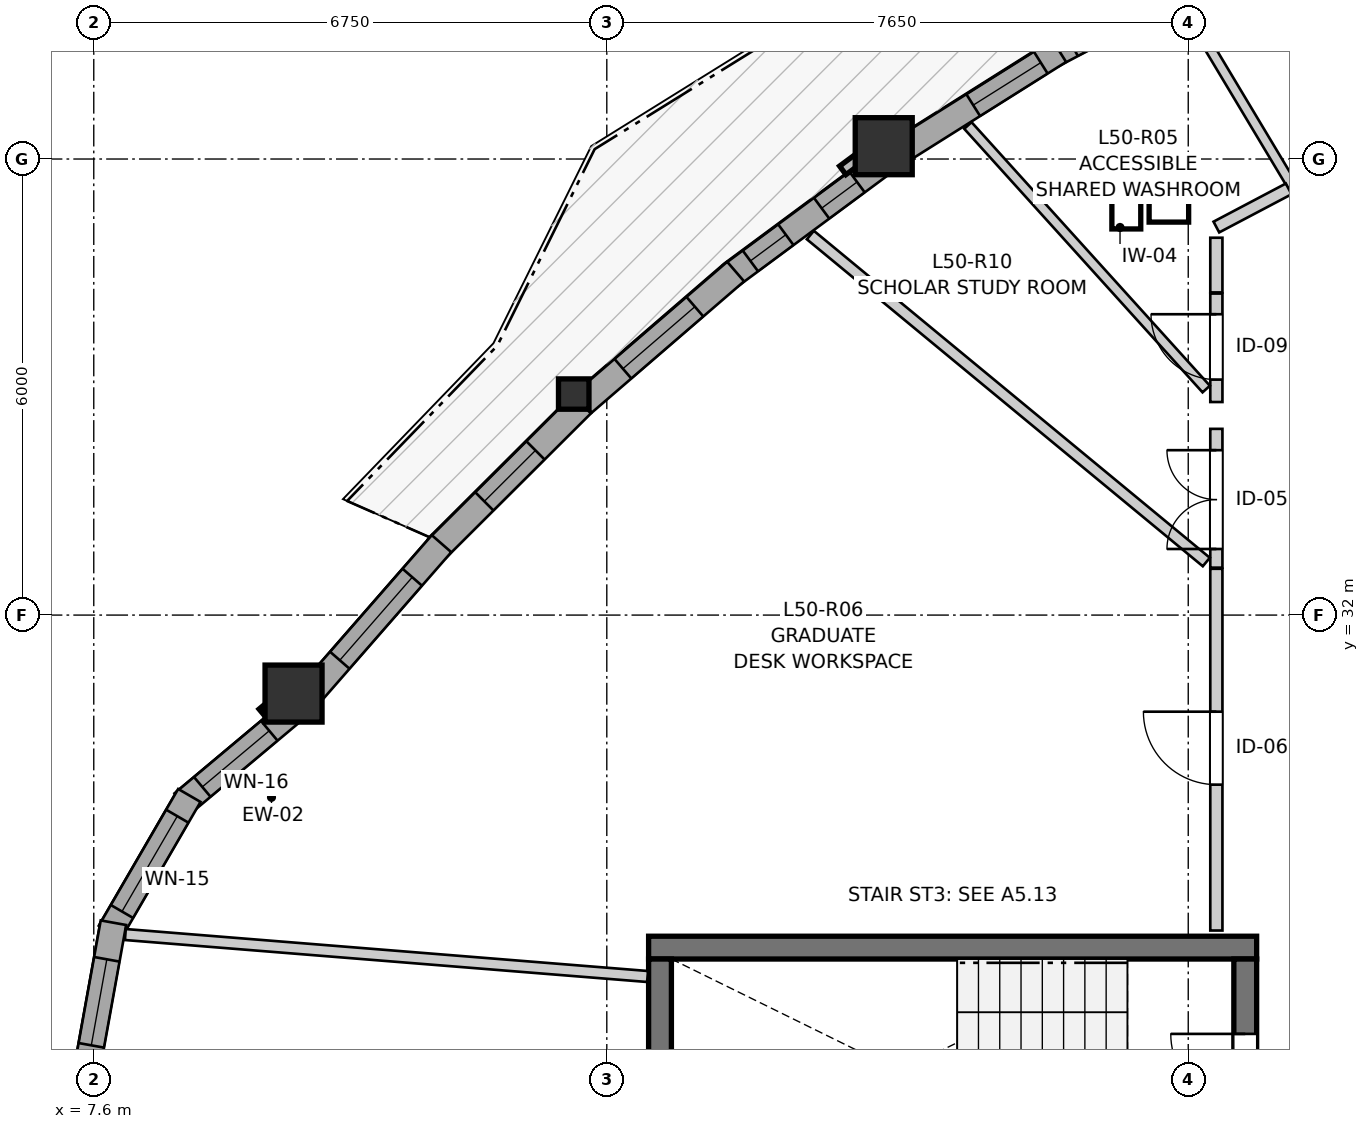
"""IFC4 building model, lengths in metres.
Left out: names, types, materials, properties, quantities, classifications, styles, units other than length and angle.
Written with IfcOpenShell. Run it as: python <this file> out.ifc"""

import sys

from ifc_helpers import new_model, si_unit, direction, frame, frame_2d, origin, origin_2d, place, context, subcontext, project, spatial, rectangle, i_section, extrude, source, transform, mapped, element, fill, save


model = new_model("IFC4")
c1 = context("Model", 3, precision=1e-05, world=origin(), true_north=direction((0.0, 1.0)))
c2 = subcontext(c1, "Body", "Model", "MODEL_VIEW")
j1 = project(units=[si_unit("LENGTHUNIT", "METRE"), si_unit("PLANEANGLEUNIT", "RADIAN")], contexts=[c1])
p1 = place(None, origin())
s1 = spatial("IfcSite", under=j1, at=p1, CompositionType="ELEMENT")
p2 = place(p1, origin())
s2 = spatial("IfcBuilding", under=s1, at=p2, CompositionType="ELEMENT")
p3 = place(p2, frame((0.0, 0.0, 168.2)))
s3 = spatial("IfcBuildingStorey", under=s2, at=p3, CompositionType="ELEMENT", Elevation=168.2)
p4 = place(p3, frame((22.9, 27.625, 0.0), z_axis=(0.0, 0.0, 1.0), x_axis=(-1.0, 0.0, 0.0)))
e1 = element("IfcWall", 1, at=p4, inside=s3, PredefinedType="SHEAR", context=c2, shape_type="SweptSolid", body=[
    extrude(rectangle(XDim=8.0, YDim=0.3, at=frame_2d((4.0, 0.0))), origin(), (0.0, 0.0, 1.0), 2.95),
])
p5 = place(p3, frame((15.05, 27.475, 0.0), z_axis=(0.0, 0.0, 1.0), x_axis=(0.0, -1.0, 0.0)))
e2 = element("IfcWall", 2, at=p5, inside=s3, PredefinedType="SHEAR", context=c2, shape_type="SweptSolid", body=[
    extrude(rectangle(XDim=2.95, YDim=0.3, at=frame_2d((1.475, 0.0))), origin(), (0.0, 0.0, 1.0), 2.95),
])
p6 = place(p3, frame((22.75, 24.525, 0.0), z_axis=(0.0, 0.0, 1.0), x_axis=(0.0, 1.0, 0.0)))
e3 = element("IfcWall", 3, at=p6, inside=s3, PredefinedType="SHEAR", context=c2, shape_type="SweptSolid", body=[
    extrude(rectangle(XDim=2.95, YDim=0.3, at=frame_2d((1.475, 0.0))), origin(), (0.0, 0.0, 1.0), 2.95),
])
p7 = place(p6, frame((0.985, 0.0, 0.0)))
e4 = element("IfcOpeningElement", 4, at=p7, cuts=e3, PredefinedType="OPENING", context=c2, shape_type="SweptSolid", body=[
    extrude(rectangle(XDim=0.98, YDim=2.15, at=frame_2d((0.49, 1.075))), frame((0.0, 0.16, 0.0), z_axis=(0.0, -1.0, 0.0), x_axis=(1.0, 0.0, 0.0)), (0.0, 0.0, 1.0), 0.32),
])
m1 = source(origin(), c2, "Body", "SweptSolid", [
    extrude(rectangle(XDim=0.75, YDim=0.75, at=origin_2d()), origin(), (0.0, 0.0, 1.0), 2.95),
])
for number, where, z_axis, x_axis in (
    (5, (10.229, 30.967, 0.0), (0.0, 0.0, 1.0), (1.0, 0.0, 0.0)),
    (6, (17.994, 38.169, 0.0), (0.0, 0.0, 1.0), (1.0, 0.0, 0.0)),
):
    element("IfcColumn", number, at=place(p3, frame(where, z_axis=z_axis, x_axis=x_axis)), inside=s3, PredefinedType="COLUMN", context=c2, shape_type="MappedRepresentation", body=[
        mapped(m1, transform((0.0, 0.0, 0.0), x_axis=(1.0, 0.0, 0.0), y_axis=(0.0, 1.0, 0.0), z_axis=(0.0, 0.0, 1.0), scale=1.0)),
    ])
m2 = source(origin(), c2, "Body", "SweptSolid", [
    extrude(i_section(OverallWidth=0.401, OverallDepth=0.399, WebThickness=0.023, FlangeThickness=0.036, FilletRadius=0.015, at=origin_2d()), origin(), (0.0, 0.0, 1.0), 2.95),
])
p8 = place(p3, frame((13.915, 34.908, 0.0), z_axis=(0.0, 0.0, 1.0), x_axis=(1.0, 0.0, 0.0)))
e7 = element("IfcColumn", 7, at=p8, inside=s3, PredefinedType="PILASTER", context=c2, shape_type="MappedRepresentation", body=[
    mapped(m2, transform((0.0, 0.0, 0.0), x_axis=(1.0, 0.0, 0.0), y_axis=(0.0, 1.0, 0.0), z_axis=(0.0, 0.0, 1.0), scale=1.0)),
])
p9 = place(p3, frame((10.219, 30.737, 0.0), z_axis=(0.0, 0.0, 1.0), x_axis=(-0.76661852922, -0.642102819381, 0.0)))
e8 = element("IfcWall", 8, at=p9, inside=s3, PredefinedType="SOLIDWALL", context=c2, shape_type="SweptSolid", body=[
    extrude(rectangle(XDim=1.888, YDim=0.34, at=frame_2d((0.944, 0.0))), origin(), (0.0, 0.0, 1.0), 2.53),
])
p10 = place(p9, frame((0.404, 0.0, 0.82)))
e9 = element("IfcOpeningElement", 9, at=p10, cuts=e8, PredefinedType="OPENING", context=c2, shape_type="SweptSolid", body=[
    extrude(rectangle(XDim=1.15, YDim=1.2, at=frame_2d((0.575, 0.6))), frame((0.0, 0.18, 0.0), z_axis=(0.0, -1.0, 0.0), x_axis=(1.0, 0.0, 0.0)), (0.0, 0.0, 1.0), 0.36),
])
p11 = place(p3, frame((8.858, 29.627, 0.0), z_axis=(0.0, 0.0, 1.0), x_axis=(-0.502177965272, -0.864764298058, 0.0)))
e10 = element("IfcWall", 10, at=p11, inside=s3, PredefinedType="SOLIDWALL", context=c2, shape_type="SweptSolid", body=[
    extrude(rectangle(XDim=2.081, YDim=0.34, at=frame_2d((1.041, 0.0))), origin(), (0.0, 0.0, 1.0), 2.53),
])
p12 = place(p11, frame((0.315, 0.0, 0.82)))
e11 = element("IfcOpeningElement", 11, at=p12, cuts=e10, PredefinedType="OPENING", context=c2, shape_type="SweptSolid", body=[
    extrude(rectangle(XDim=1.45, YDim=1.25, at=frame_2d((0.725, 0.625))), frame((0.0, 0.18, 0.0), z_axis=(0.0, -1.0, 0.0), x_axis=(1.0, 0.0, 0.0)), (0.0, 0.0, 1.0), 0.36),
])
p13 = place(p3, frame((7.859, 27.953, 0.0), z_axis=(0.0, 0.0, 1.0), x_axis=(-0.177605215389, -0.984101817632, 0.0)))
e12 = element("IfcWall", 12, at=p13, inside=s3, PredefinedType="SOLIDWALL", context=c2, shape_type="SweptSolid", body=[
    extrude(rectangle(XDim=2.081, YDim=0.34, at=frame_2d((1.041, 0.0))), origin(), (0.0, 0.0, 1.0), 2.53),
])
p14 = place(p13, frame((0.489, 0.0, 0.82)))
e13 = element("IfcOpeningElement", 13, at=p14, cuts=e12, PredefinedType="OPENING", context=c2, shape_type="SweptSolid", body=[
    extrude(rectangle(XDim=1.15, YDim=1.2, at=frame_2d((0.575, 0.6))), frame((0.0, 0.18, 0.0), z_axis=(0.0, -1.0, 0.0), x_axis=(1.0, 0.0, 0.0)), (0.0, 0.0, 1.0), 0.36),
])
p15 = place(p3, frame((22.526, 40.591, 0.0), z_axis=(0.0, 0.0, 1.0), x_axis=(-0.884394438343, -0.46674026763, 0.0)))
e14 = element("IfcWall", 14, at=p15, inside=s3, PredefinedType="SOLIDWALL", context=c2, shape_type="SweptSolid", body=[
    extrude(rectangle(XDim=2.601, YDim=0.34, at=frame_2d((1.301, 0.0))), origin(), (0.0, 0.0, 1.0), 2.53),
])
p16 = place(p15, frame((0.977, 0.0, 0.82)))
e15 = element("IfcOpeningElement", 15, at=p16, cuts=e14, PredefinedType="OPENING", context=c2, shape_type="SweptSolid", body=[
    extrude(rectangle(XDim=1.35, YDim=1.45, at=frame_2d((0.675, 0.725))), frame((0.0, 0.18, 0.0), z_axis=(0.0, -1.0, 0.0), x_axis=(1.0, 0.0, 0.0)), (0.0, 0.0, 1.0), 0.36),
])
p17 = place(p3, frame((20.303, 39.421, 0.0), z_axis=(0.0, 0.0, 1.0), x_axis=(-0.846381586821, -0.532576951707, 0.0)))
e16 = element("IfcWall", 16, at=p17, inside=s3, PredefinedType="SOLIDWALL", context=c2, shape_type="SweptSolid", body=[
    extrude(rectangle(XDim=2.466, YDim=0.34, at=frame_2d((1.233, 0.0))), origin(), (0.0, 0.0, 1.0), 2.53),
])
p18 = place(p17, frame((0.287, 0.0, 0.82)))
e17 = element("IfcOpeningElement", 17, at=p18, cuts=e16, PredefinedType="OPENING", context=c2, shape_type="SweptSolid", body=[
    extrude(rectangle(XDim=1.05, YDim=1.45, at=frame_2d((0.525, 0.725))), frame((0.0, 0.18, 0.0), z_axis=(0.0, -1.0, 0.0), x_axis=(1.0, 0.0, 0.0)), (0.0, 0.0, 1.0), 0.36),
])
p19 = place(p3, frame((17.97, 37.94, 0.0), z_axis=(0.0, 0.0, 1.0), x_axis=(-0.803844722302, -0.594839190393, 0.0)))
e18 = element("IfcWall", 18, at=p19, inside=s3, PredefinedType="SOLIDWALL", context=c2, shape_type="SweptSolid", body=[
    extrude(rectangle(XDim=2.481, YDim=0.34, at=frame_2d((1.24, 0.0))), origin(), (0.0, 0.0, 1.0), 2.53),
])
p20 = place(p19, frame((0.407, 0.0, 0.82)))
e19 = element("IfcOpeningElement", 19, at=p20, cuts=e18, PredefinedType="OPENING", context=c2, shape_type="SweptSolid", body=[
    extrude(rectangle(XDim=0.58, YDim=1.35, at=frame_2d((0.29, 0.675))), frame((0.0, 0.18, 0.0), z_axis=(0.0, -1.0, 0.0), x_axis=(1.0, 0.0, 0.0)), (0.0, 0.0, 1.0), 0.36),
])
p21 = place(p19, frame((1.573, 0.0, 0.82)))
e20 = element("IfcOpeningElement", 20, at=p21, cuts=e18, PredefinedType="OPENING", context=c2, shape_type="SweptSolid", body=[
    extrude(rectangle(XDim=0.58, YDim=1.35, at=frame_2d((0.29, 0.675))), frame((0.0, 0.18, 0.0), z_axis=(0.0, -1.0, 0.0), x_axis=(1.0, 0.0, 0.0)), (0.0, 0.0, 1.0), 0.36),
])
p22 = place(p3, frame((16.045, 36.519, 0.0), z_axis=(0.0, 0.0, 1.0), x_axis=(-0.757449302754, -0.652893983551, 0.0)))
e21 = element("IfcWall", 21, at=p22, inside=s3, PredefinedType="SOLIDWALL", context=c2, shape_type="SweptSolid", body=[
    extrude(rectangle(XDim=2.646, YDim=0.34, at=frame_2d((1.323, 0.0))), origin(), (0.0, 0.0, 1.0), 2.53),
])
p23 = place(p22, frame((0.708, 0.0, 0.82)))
e22 = element("IfcOpeningElement", 22, at=p23, cuts=e21, PredefinedType="OPENING", context=c2, shape_type="SweptSolid", body=[
    extrude(rectangle(XDim=1.25, YDim=1.35, at=frame_2d((0.625, 0.675))), frame((0.0, 0.18, 0.0), z_axis=(0.0, -1.0, 0.0), x_axis=(1.0, 0.0, 0.0)), (0.0, 0.0, 1.0), 0.36),
])
p24 = place(p3, frame((14.021, 34.773, 0.0), z_axis=(0.0, 0.0, 1.0), x_axis=(-0.708421987765, -0.705789123784, 0.0)))
e23 = element("IfcWall", 23, at=p24, inside=s3, PredefinedType="SOLIDWALL", context=c2, shape_type="SweptSolid", body=[
    extrude(rectangle(XDim=2.689, YDim=0.34, at=frame_2d((1.345, 0.0))), origin(), (0.0, 0.0, 1.0), 2.53),
])
p25 = place(p24, frame((0.86, 0.0, 0.82)))
e24 = element("IfcOpeningElement", 24, at=p25, cuts=e23, PredefinedType="OPENING", context=c2, shape_type="SweptSolid", body=[
    extrude(rectangle(XDim=0.95, YDim=1.35, at=frame_2d((0.475, 0.675))), frame((0.0, 0.18, 0.0), z_axis=(0.0, -1.0, 0.0), x_axis=(1.0, 0.0, 0.0)), (0.0, 0.0, 1.0), 0.36),
])
p26 = place(p3, frame((12.176, 32.939, 0.0), z_axis=(0.0, 0.0, 1.0), x_axis=(-0.65766354423, -0.753311796397, 0.0)))
e25 = element("IfcWall", 25, at=p26, inside=s3, PredefinedType="SOLIDWALL", context=c2, shape_type="SweptSolid", body=[
    extrude(rectangle(XDim=2.611, YDim=0.34, at=frame_2d((1.306, 0.0))), origin(), (0.0, 0.0, 1.0), 2.53),
])
p27 = place(p26, frame((0.586, 0.0, 0.82)))
e26 = element("IfcOpeningElement", 26, at=p27, cuts=e25, PredefinedType="OPENING", context=c2, shape_type="SweptSolid", body=[
    extrude(rectangle(XDim=1.45, YDim=1.25, at=frame_2d((0.725, 0.625))), frame((0.0, 0.18, 0.0), z_axis=(0.0, -1.0, 0.0), x_axis=(1.0, 0.0, 0.0)), (0.0, 0.0, 1.0), 0.36),
])
p28 = place(p3, frame((22.37, 27.85, 0.0), z_axis=(0.0, 0.0, 1.0), x_axis=(0.0, 1.0, 0.0)))
e27 = element("IfcWall", 27, at=p28, inside=s3, PredefinedType="PARTITIONING", context=c2, shape_type="SweptSolid", body=[
    extrude(rectangle(XDim=4.759, YDim=0.16, at=frame_2d((2.379, 0.0))), origin(), (0.0, 0.0, 1.0), 2.95),
])
p29 = place(p28, frame((1.919, 0.0, 0.0)))
e28 = element("IfcOpeningElement", 28, at=p29, cuts=e27, PredefinedType="OPENING", context=c2, shape_type="SweptSolid", body=[
    extrude(rectangle(XDim=0.96, YDim=2.1, at=frame_2d((0.48, 1.05))), frame((0.0, 0.09, 0.0), z_axis=(0.0, -1.0, 0.0), x_axis=(1.0, 0.0, 0.0)), (0.0, 0.0, 1.0), 0.18),
])
p30 = place(p3, frame((22.37, 32.624, 0.0), z_axis=(0.0, 0.0, 1.0), x_axis=(0.0, 1.0, 0.0)))
e29 = element("IfcWall", 29, at=p30, inside=s3, PredefinedType="PARTITIONING", context=c2, shape_type="SweptSolid", body=[
    extrude(rectangle(XDim=1.826, YDim=0.16, at=frame_2d((0.913, 0.0))), origin(), (0.0, 0.0, 1.0), 2.95),
])
p31 = place(p30, frame((0.246, 0.0, 0.0)))
e30 = element("IfcOpeningElement", 30, at=p31, cuts=e29, PredefinedType="OPENING", context=c2, shape_type="SweptSolid", body=[
    extrude(rectangle(XDim=1.3, YDim=2.1, at=frame_2d((0.65, 1.05))), frame((0.0, 0.09, 0.0), z_axis=(0.0, -1.0, 0.0), x_axis=(1.0, 0.0, 0.0)), (0.0, 0.0, 1.0), 0.18),
])
p32 = place(p3, frame((22.37, 34.803, 0.0), z_axis=(0.0, 0.0, 1.0), x_axis=(0.0, 1.0, 0.0)))
e31 = element("IfcWall", 31, at=p32, inside=s3, PredefinedType="PARTITIONING", context=c2, shape_type="SweptSolid", body=[
    extrude(rectangle(XDim=1.427, YDim=0.16, at=frame_2d((0.713, 0.0))), origin(), (0.0, 0.0, 1.0), 2.95),
])
p33 = place(p32, frame((0.295, 0.0, 0.0)))
e32 = element("IfcOpeningElement", 32, at=p33, cuts=e31, PredefinedType="OPENING", context=c2, shape_type="SweptSolid", body=[
    extrude(rectangle(XDim=0.86, YDim=2.05, at=frame_2d((0.43, 1.025))), frame((0.0, 0.09, 0.0), z_axis=(0.0, -1.0, 0.0), x_axis=(1.0, 0.0, 0.0)), (0.0, 0.0, 1.0), 0.18),
])
p34 = place(p3, frame((17.028, 37.0, 0.0), z_axis=(0.0, 0.0, 1.0), x_axis=(0.771119105053, -0.636690918596, 0.0)))
e33 = element("IfcWall", 33, at=p34, inside=s3, PredefinedType="PARTITIONING", context=c2, shape_type="SweptSolid", body=[
    extrude(rectangle(XDim=6.756, YDim=0.145, at=frame_2d((3.378, 0.0))), origin(), (0.0, 0.0, 1.0), 2.95),
])
p35 = place(p3, frame((8.015, 27.797, 0.0), z_axis=(0.0, 0.0, 1.0), x_axis=(0.996785477909, -0.080116858581, 0.0)))
e34 = element("IfcWall", 34, at=p35, inside=s3, PredefinedType="PARTITIONING", context=c2, shape_type="SweptSolid", body=[
    extrude(rectangle(XDim=6.893, YDim=0.145, at=frame_2d((3.447, 0.0))), origin(), (0.0, 0.0, 1.0), 2.95),
])
p36 = place(p3, frame((19.101, 38.441, 0.0), z_axis=(0.0, 0.0, 1.0), x_axis=(0.670702711046, -0.741726279295, 0.0)))
e35 = element("IfcWall", 35, at=p36, inside=s3, PredefinedType="PARTITIONING", context=c2, shape_type="SweptSolid", body=[
    extrude(rectangle(XDim=4.675, YDim=0.13, at=frame_2d((2.337, 0.0))), origin(), (0.0, 0.0, 1.0), 2.95),
])
p37 = place(p3, frame((21.92, 40.065, 0.0), z_axis=(0.0, 0.0, 1.0), x_axis=(0.514051974364, -0.857759038223, 0.0)))
e36 = element("IfcWall", 36, at=p37, inside=s3, PredefinedType="PARTITIONING", context=c2, shape_type="SweptSolid", body=[
    extrude(rectangle(XDim=2.832, YDim=0.13, at=frame_2d((1.416, 0.0))), origin(), (0.0, 0.0, 1.0), 2.95),
])
p38 = place(p3, frame((22.37, 37.105, 0.0), z_axis=(0.0, 0.0, 1.0), x_axis=(0.884455008011, 0.466625480234, 0.0)))
e37 = element("IfcWall", 37, at=p38, inside=s3, PredefinedType="PARTITIONING", context=c2, shape_type="SweptSolid", body=[
    extrude(rectangle(XDim=1.076, YDim=0.16, at=frame_2d((0.538, 0.0))), origin(), (0.0, 0.0, 1.0), 2.558),
])
p39 = place(p3, frame((22.37, 36.245, 0.0), z_axis=(0.0, 0.0, 1.0), x_axis=(0.0, 1.0, 0.0)))
e38 = element("IfcWall", 38, at=p39, inside=s3, PredefinedType="PARTITIONING", context=c2, shape_type="SweptSolid", body=[
    extrude(rectangle(XDim=0.719, YDim=0.16, at=frame_2d((0.36, 0.0))), origin(), (0.0, 0.0, 1.0), 2.95),
])
m3 = source(origin(), c2, "Body", "SweptSolid", [
    extrude(rectangle(XDim=1.15, YDim=1.2, at=frame_2d((0.575, 0.6))), frame((0.0, 0.03, 0.0), z_axis=(0.0, -1.0, 0.0), x_axis=(1.0, 0.0, 0.0)), (0.0, 0.0, 1.0), 0.06),
])
p40 = place(p10, origin())
e39 = element("IfcWindow", 39, at=p40, inside=s3, PartitioningType="SINGLE_PANEL", PredefinedType="WINDOW", context=c2, shape_type="MappedRepresentation", body=[
    mapped(m3, transform((0.0, 0.0, 0.0), x_axis=(1.0, 0.0, 0.0), y_axis=(0.0, 1.0, 0.0), z_axis=(0.0, 0.0, 1.0), scale=1.0)),
])
fill(e9, e39)
m4 = source(origin(), c2, "Body", "SweptSolid", [
    extrude(rectangle(XDim=1.45, YDim=1.25, at=frame_2d((0.725, 0.625))), frame((0.0, 0.03, 0.0), z_axis=(0.0, -1.0, 0.0), x_axis=(1.0, 0.0, 0.0)), (0.0, 0.0, 1.0), 0.06),
])
p41 = place(p12, origin())
e40 = element("IfcWindow", 40, at=p41, inside=s3, PartitioningType="SINGLE_PANEL", PredefinedType="WINDOW", context=c2, shape_type="MappedRepresentation", body=[
    mapped(m4, transform((0.0, 0.0, 0.0), x_axis=(1.0, 0.0, 0.0), y_axis=(0.0, 1.0, 0.0), z_axis=(0.0, 0.0, 1.0), scale=1.0)),
])
fill(e11, e40)
p42 = place(p14, origin())
e41 = element("IfcWindow", 41, at=p42, inside=s3, PartitioningType="SINGLE_PANEL", PredefinedType="WINDOW", context=c2, shape_type="MappedRepresentation", body=[
    mapped(m3, transform((0.0, 0.0, 0.0), x_axis=(1.0, 0.0, 0.0), y_axis=(0.0, 1.0, 0.0), z_axis=(0.0, 0.0, 1.0), scale=1.0)),
])
fill(e13, e41)
m5 = source(origin(), c2, "Body", "SweptSolid", [
    extrude(rectangle(XDim=1.05, YDim=1.45, at=frame_2d((0.525, 0.725))), frame((0.0, 0.03, 0.0), z_axis=(0.0, -1.0, 0.0), x_axis=(1.0, 0.0, 0.0)), (0.0, 0.0, 1.0), 0.06),
])
p43 = place(p18, origin())
e42 = element("IfcWindow", 42, at=p43, inside=s3, PartitioningType="SINGLE_PANEL", PredefinedType="WINDOW", context=c2, shape_type="MappedRepresentation", body=[
    mapped(m5, transform((0.0, 0.0, 0.0), x_axis=(1.0, 0.0, 0.0), y_axis=(0.0, 1.0, 0.0), z_axis=(0.0, 0.0, 1.0), scale=1.0)),
])
fill(e17, e42)
m6 = source(origin(), c2, "Body", "SweptSolid", [
    extrude(rectangle(XDim=0.58, YDim=1.35, at=frame_2d((0.29, 0.675))), frame((0.0, 0.03, 0.0), z_axis=(0.0, -1.0, 0.0), x_axis=(1.0, 0.0, 0.0)), (0.0, 0.0, 1.0), 0.06),
])
p44 = place(p20, origin())
e43 = element("IfcWindow", 43, at=p44, inside=s3, PartitioningType="SINGLE_PANEL", PredefinedType="WINDOW", context=c2, shape_type="MappedRepresentation", body=[
    mapped(m6, transform((0.0, 0.0, 0.0), x_axis=(1.0, 0.0, 0.0), y_axis=(0.0, 1.0, 0.0), z_axis=(0.0, 0.0, 1.0), scale=1.0)),
])
fill(e19, e43)
p45 = place(p21, origin())
e44 = element("IfcWindow", 44, at=p45, inside=s3, PartitioningType="SINGLE_PANEL", PredefinedType="WINDOW", context=c2, shape_type="MappedRepresentation", body=[
    mapped(m6, transform((0.0, 0.0, 0.0), x_axis=(1.0, 0.0, 0.0), y_axis=(0.0, 1.0, 0.0), z_axis=(0.0, 0.0, 1.0), scale=1.0)),
])
fill(e20, e44)
m7 = source(origin(), c2, "Body", "SweptSolid", [
    extrude(rectangle(XDim=1.25, YDim=1.35, at=frame_2d((0.625, 0.675))), frame((0.0, 0.03, 0.0), z_axis=(0.0, -1.0, 0.0), x_axis=(1.0, 0.0, 0.0)), (0.0, 0.0, 1.0), 0.06),
])
p46 = place(p23, origin())
e45 = element("IfcWindow", 45, at=p46, inside=s3, PartitioningType="SINGLE_PANEL", PredefinedType="WINDOW", context=c2, shape_type="MappedRepresentation", body=[
    mapped(m7, transform((0.0, 0.0, 0.0), x_axis=(1.0, 0.0, 0.0), y_axis=(0.0, 1.0, 0.0), z_axis=(0.0, 0.0, 1.0), scale=1.0)),
])
fill(e22, e45)
m8 = source(origin(), c2, "Body", "SweptSolid", [
    extrude(rectangle(XDim=0.95, YDim=1.35, at=frame_2d((0.475, 0.675))), frame((0.0, 0.03, 0.0), z_axis=(0.0, -1.0, 0.0), x_axis=(1.0, 0.0, 0.0)), (0.0, 0.0, 1.0), 0.06),
])
p47 = place(p25, origin())
e46 = element("IfcWindow", 46, at=p47, inside=s3, PartitioningType="SINGLE_PANEL", PredefinedType="WINDOW", context=c2, shape_type="MappedRepresentation", body=[
    mapped(m8, transform((0.0, 0.0, 0.0), x_axis=(1.0, 0.0, 0.0), y_axis=(0.0, 1.0, 0.0), z_axis=(0.0, 0.0, 1.0), scale=1.0)),
])
fill(e24, e46)
p48 = place(p27, origin())
e47 = element("IfcWindow", 47, at=p48, inside=s3, PartitioningType="SINGLE_PANEL", PredefinedType="WINDOW", context=c2, shape_type="MappedRepresentation", body=[
    mapped(m4, transform((0.0, 0.0, 0.0), x_axis=(1.0, 0.0, 0.0), y_axis=(0.0, 1.0, 0.0), z_axis=(0.0, 0.0, 1.0), scale=1.0)),
])
fill(e26, e47)
m9 = source(origin(), c2, "Body", "SweptSolid", [
    extrude(rectangle(XDim=0.98, YDim=2.15, at=frame_2d((0.49, 1.075))), frame((0.0, 0.025, 0.0), z_axis=(0.0, -1.0, 0.0), x_axis=(1.0, 0.0, 0.0)), (0.0, 0.0, 1.0), 0.05),
])
p49 = place(p7, origin())
e48 = element("IfcDoor", 48, at=p49, inside=s3, OperationType="SINGLE_SWING_RIGHT", PredefinedType="DOOR", context=c2, shape_type="MappedRepresentation", body=[
    mapped(m9, transform((0.0, 0.0, 0.0), x_axis=(1.0, 0.0, 0.0), y_axis=(0.0, 1.0, 0.0), z_axis=(0.0, 0.0, 1.0), scale=1.0)),
])
fill(e4, e48)
m10 = source(origin(), c2, "Body", "SweptSolid", [
    extrude(rectangle(XDim=0.96, YDim=2.1, at=frame_2d((0.48, 1.05))), frame((0.0, 0.025, 0.0), z_axis=(0.0, -1.0, 0.0), x_axis=(1.0, 0.0, 0.0)), (0.0, 0.0, 1.0), 0.05),
])
p50 = place(p29, origin())
e49 = element("IfcDoor", 49, at=p50, inside=s3, OperationType="SINGLE_SWING_RIGHT", PredefinedType="DOOR", context=c2, shape_type="MappedRepresentation", body=[
    mapped(m10, transform((0.0, 0.0, 0.0), x_axis=(1.0, 0.0, 0.0), y_axis=(0.0, 1.0, 0.0), z_axis=(0.0, 0.0, 1.0), scale=1.0)),
])
fill(e28, e49)
m11 = source(origin(), c2, "Body", "SweptSolid", [
    extrude(rectangle(XDim=1.3, YDim=2.1, at=frame_2d((0.65, 1.05))), frame((0.0, 0.025, 0.0), z_axis=(0.0, -1.0, 0.0), x_axis=(1.0, 0.0, 0.0)), (0.0, 0.0, 1.0), 0.05),
])
p51 = place(p31, origin())
e50 = element("IfcDoor", 50, at=p51, inside=s3, OperationType="DOUBLE_DOOR_SINGLE_SWING", PredefinedType="DOOR", context=c2, shape_type="MappedRepresentation", body=[
    mapped(m11, transform((0.0, 0.0, 0.0), x_axis=(1.0, 0.0, 0.0), y_axis=(0.0, 1.0, 0.0), z_axis=(0.0, 0.0, 1.0), scale=1.0)),
])
fill(e30, e50)
m12 = source(origin(), c2, "Body", "SweptSolid", [
    extrude(rectangle(XDim=0.86, YDim=2.05, at=frame_2d((0.43, 1.025))), frame((0.0, 0.025, 0.0), z_axis=(0.0, -1.0, 0.0), x_axis=(1.0, 0.0, 0.0)), (0.0, 0.0, 1.0), 0.05),
])
p52 = place(p33, origin())
e51 = element("IfcDoor", 51, at=p52, inside=s3, OperationType="SINGLE_SWING_RIGHT", PredefinedType="DOOR", context=c2, shape_type="MappedRepresentation", body=[
    mapped(m12, transform((0.0, 0.0, 0.0), x_axis=(1.0, 0.0, 0.0), y_axis=(0.0, 1.0, 0.0), z_axis=(0.0, 0.0, 1.0), scale=1.0)),
])
fill(e32, e51)
save(model, sys.argv[1])
